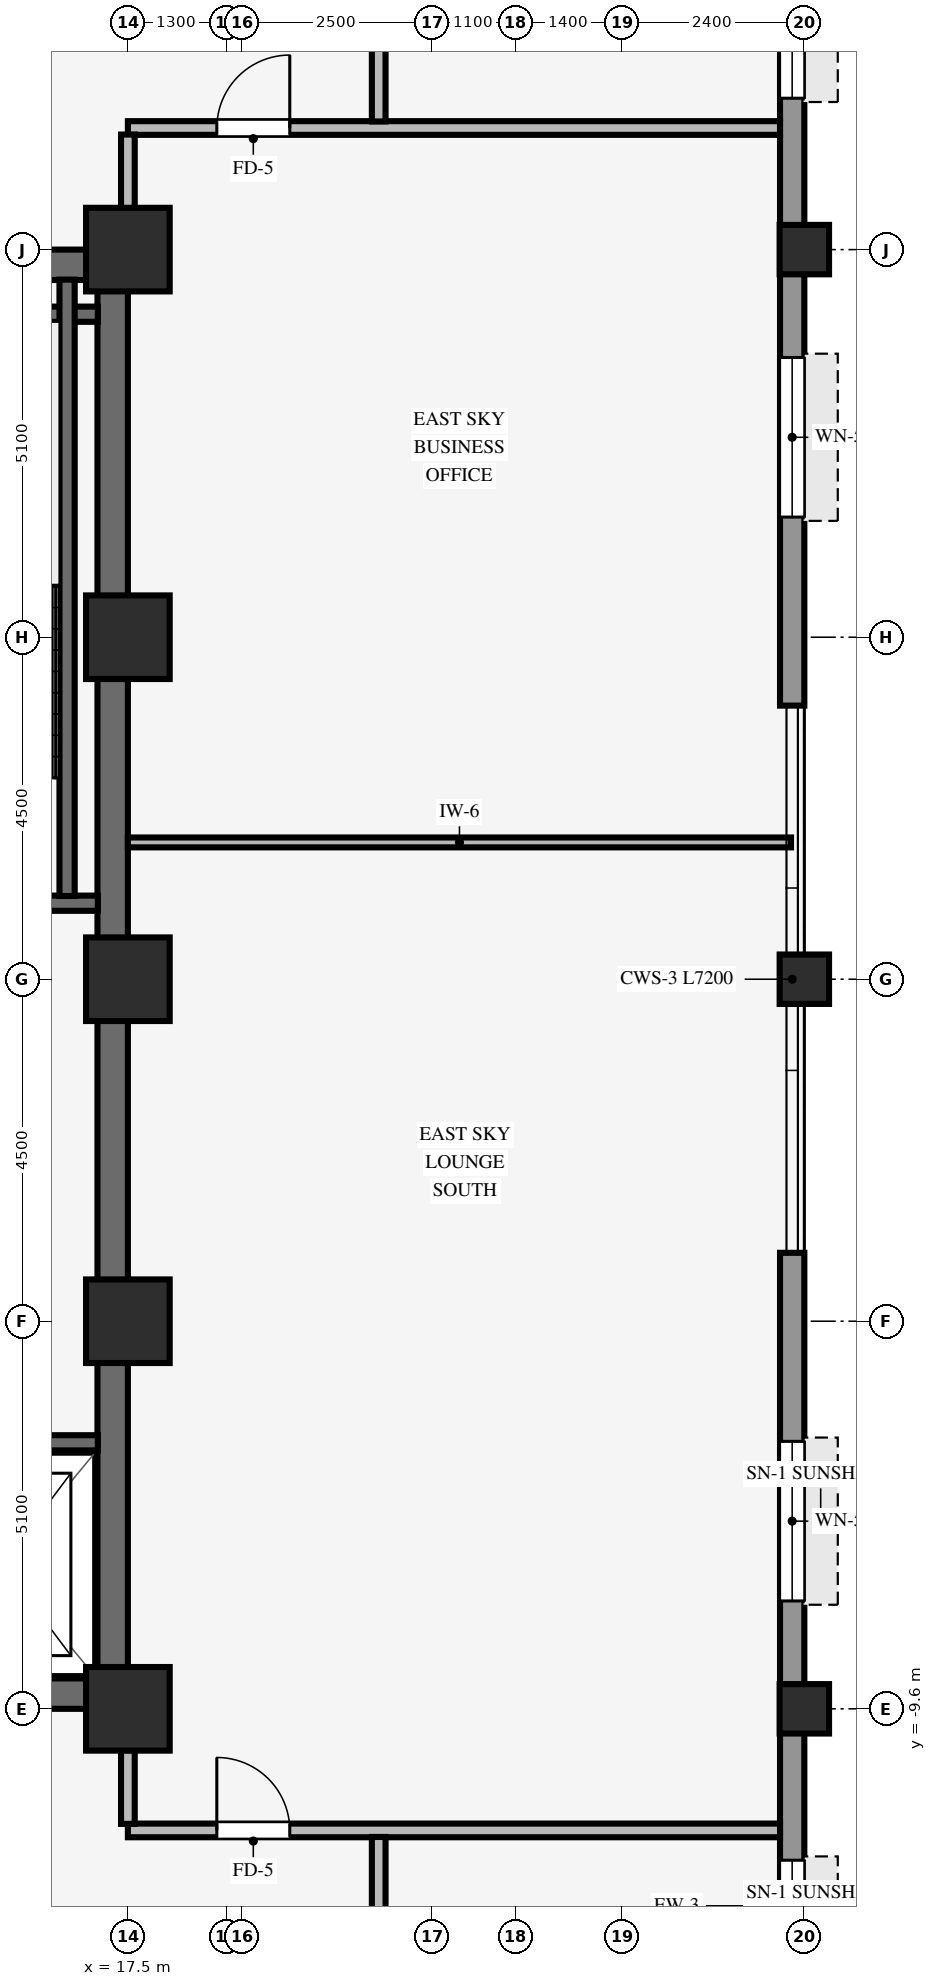
"""IFC4 building model, lengths in metres.
Left out: names, types, materials, properties, quantities, classifications, styles, units other than length and angle.
Written with IfcOpenShell. Run it as: python <this file> out.ifc"""

import sys

from ifc_helpers import new_model, si_unit, direction, frame, frame_2d, origin, origin_2d, place, context, subcontext, project, spatial, rectangle, hollow_rectangle, extrude, source, transform, mapped, element, fill, save


model = new_model("IFC4")
c1 = context("Model", 3, precision=1e-05, world=origin(), true_north=direction((0.0, 1.0)))
c2 = subcontext(c1, "Body", "Model", "MODEL_VIEW")
j1 = project(units=[si_unit("LENGTHUNIT", "METRE"), si_unit("PLANEANGLEUNIT", "RADIAN")], contexts=[c1])
p1 = place(None, origin())
s1 = spatial("IfcSite", under=j1, at=p1, CompositionType="ELEMENT")
p2 = place(p1, origin())
s2 = spatial("IfcBuilding", under=s1, at=p2, CompositionType="ELEMENT")
p3 = place(p2, frame((0.0, 0.0, 120.2)))
s3 = spatial("IfcBuildingStorey", under=s2, at=p3, CompositionType="ELEMENT", Elevation=120.2)
for number, where, z_axis, x_axis in (
    (1, (9.0, -9.4, 0.0), (0.0, 0.0, 1.0), (1.0, 0.0, 0.0)),
    (2, (9.0, 9.4, 0.0), (0.0, 0.0, 1.0), (1.0, 0.0, 0.0)),
):
    element("IfcWall", number, at=place(p3, frame(where, z_axis=z_axis, x_axis=x_axis)), inside=s3, PredefinedType="SHEAR", context=c2, shape_type="SweptSolid", body=[
        extrude(rectangle(XDim=8.5, YDim=0.4, at=frame_2d((4.25, 0.0))), origin(), (0.0, 0.0, 1.0), 3.37),
    ])
p4 = place(p3, frame((17.3, -9.205, 0.0), z_axis=(0.0, 0.0, 1.0), x_axis=(0.0, 1.0, 0.0)))
e3 = element("IfcWall", 3, at=p4, inside=s3, PredefinedType="SHEAR", context=c2, shape_type="SweptSolid", body=[
    extrude(rectangle(XDim=18.41, YDim=0.4, at=frame_2d((9.205, 0.0))), origin(), (0.0, 0.0, 1.0), 3.37),
])
for number, where, z_axis, x_axis in (
    (4, (17.5, -9.6, 0.0), (0.0, 0.0, 1.0), (1.0, 0.0, 0.0)),
    (5, (17.5, -4.5, 0.0), (0.0, 0.0, 1.0), (1.0, 0.0, 0.0)),
    (6, (17.5, 4.5, 0.0), (0.0, 0.0, 1.0), (1.0, 0.0, 0.0)),
    (7, (17.5, 9.6, 0.0), (0.0, 0.0, 1.0), (1.0, 0.0, 0.0)),
    (8, (17.5, 0.0, 0.0), (0.0, 0.0, 1.0), (1.0, 0.0, 0.0)),
):
    element("IfcColumn", number, at=place(p3, frame(where, z_axis=z_axis, x_axis=x_axis)), inside=s3, PredefinedType="COLUMN", context=c2, shape_type="SweptSolid", body=[
        extrude(rectangle(XDim=1.1, YDim=1.1, at=origin_2d()), origin(), (0.0, 0.0, 1.0), 3.37),
    ])
for number, where, z_axis, x_axis in (
    (9, (26.4, -9.6, 0.0), (0.0, 0.0, 1.0), (1.0, 0.0, 0.0)),
    (10, (26.4, 0.0, 0.0), (0.0, 0.0, 1.0), (1.0, 0.0, 0.0)),
    (11, (26.4, 9.6, 0.0), (0.0, 0.0, 1.0), (1.0, 0.0, 0.0)),
):
    element("IfcColumn", number, at=place(p3, frame(where, z_axis=z_axis, x_axis=x_axis)), inside=s3, PredefinedType="COLUMN", context=c2, shape_type="SweptSolid", body=[
        extrude(hollow_rectangle(XDim=0.65, YDim=0.65, WallThickness=0.04, InnerFilletRadius=0.04, OuterFilletRadius=0.08, at=origin_2d()), origin(), (0.0, 0.0, 1.0), 3.37),
    ])
p5 = place(p3, frame((26.24, -20.784, 0.0), z_axis=(0.0, 0.0, 1.0), x_axis=(0.0, 1.0, 0.0)))
e12 = element("IfcWall", 12, at=p5, inside=s3, PredefinedType="STANDARD", context=c2, shape_type="SweptSolid", body=[
    extrude(rectangle(XDim=17.184, YDim=0.32, at=frame_2d((8.592, 0.0))), origin(), (0.0, 0.0, 1.0), 2.705),
])
p6 = place(p5, frame((7.092, 0.0, 0.8)))
e13 = element("IfcOpeningElement", 13, at=p6, cuts=e12, PredefinedType="OPENING", context=c2, shape_type="SweptSolid", body=[
    extrude(rectangle(XDim=2.1, YDim=1.56, at=frame_2d((1.05, 0.78))), frame((0.0, 0.17, 0.0), z_axis=(0.0, -1.0, 0.0), x_axis=(1.0, 0.0, 0.0)), (0.0, 0.0, 1.0), 0.34),
])
p7 = place(p5, frame((12.603, 0.0, 0.8)))
e14 = element("IfcOpeningElement", 14, at=p7, cuts=e12, PredefinedType="OPENING", context=c2, shape_type="SweptSolid", body=[
    extrude(rectangle(XDim=2.1, YDim=1.56, at=frame_2d((1.05, 0.78))), frame((0.0, 0.17, 0.0), z_axis=(0.0, -1.0, 0.0), x_axis=(1.0, 0.0, 0.0)), (0.0, 0.0, 1.0), 0.34),
])
p8 = place(p3, frame((26.24, 3.6, 0.0), z_axis=(0.0, 0.0, 1.0), x_axis=(0.0, 1.0, 0.0)))
e15 = element("IfcWall", 15, at=p8, inside=s3, PredefinedType="STANDARD", context=c2, shape_type="SweptSolid", body=[
    extrude(rectangle(XDim=17.184, YDim=0.32, at=frame_2d((8.592, 0.0))), origin(), (0.0, 0.0, 1.0), 2.705),
])
p9 = place(p8, frame((2.481, 0.0, 0.8)))
e16 = element("IfcOpeningElement", 16, at=p9, cuts=e15, PredefinedType="OPENING", context=c2, shape_type="SweptSolid", body=[
    extrude(rectangle(XDim=2.1, YDim=1.56, at=frame_2d((1.05, 0.78))), frame((0.0, 0.17, 0.0), z_axis=(0.0, -1.0, 0.0), x_axis=(1.0, 0.0, 0.0)), (0.0, 0.0, 1.0), 0.34),
])
p10 = place(p8, frame((7.992, 0.0, 0.8)))
e17 = element("IfcOpeningElement", 17, at=p10, cuts=e15, PredefinedType="OPENING", context=c2, shape_type="SweptSolid", body=[
    extrude(rectangle(XDim=2.1, YDim=1.56, at=frame_2d((1.05, 0.78))), frame((0.0, 0.17, 0.0), z_axis=(0.0, -1.0, 0.0), x_axis=(1.0, 0.0, 0.0)), (0.0, 0.0, 1.0), 0.34),
])
for number, where, z_axis, x_axis in (
    (18, (13.535, 1.0, 0.0), (0.0, 0.0, 1.0), (1.0, 0.0, 0.0)),
    (19, (13.535, 8.75, 0.0), (0.0, 0.0, 1.0), (1.0, 0.0, 0.0)),
):
    element("IfcWall", number, at=place(p3, frame(where, z_axis=z_axis, x_axis=x_axis)), inside=s3, PredefinedType="SHEAR", context=c2, shape_type="SweptSolid", body=[
        extrude(rectangle(XDim=3.57, YDim=0.2, at=frame_2d((1.785, 0.0))), origin(), (0.0, 0.0, 1.0), 3.37),
    ])
p11 = place(p3, frame((16.7, 1.095, 0.0), z_axis=(0.0, 0.0, 1.0), x_axis=(0.0, 1.0, 0.0)))
e20 = element("IfcWall", 20, at=p11, inside=s3, PredefinedType="SHEAR", context=c2, shape_type="SweptSolid", body=[
    extrude(rectangle(XDim=8.11, YDim=0.2, at=frame_2d((4.055, 0.0))), origin(), (0.0, 0.0, 1.0), 3.37),
])
p12 = place(p3, frame((14.645, -6.1, 0.0), z_axis=(0.0, 0.0, 1.0), x_axis=(1.0, 0.0, 0.0)))
e21 = element("IfcWall", 21, at=p12, inside=s3, PredefinedType="SHEAR", context=c2, shape_type="SweptSolid", body=[
    extrude(rectangle(XDim=2.46, YDim=0.2, at=frame_2d((1.23, 0.0))), origin(), (0.0, 0.0, 1.0), 3.37),
])
p13 = place(p3, frame((17.5, -11.2, 0.0), z_axis=(0.0, 0.0, 1.0), x_axis=(1.0, 0.0, 0.0)))
e22 = element("IfcWall", 22, at=p13, inside=s3, PredefinedType="PARTITIONING", context=c2, shape_type="SweptSolid", body=[
    extrude(rectangle(XDim=8.58, YDim=0.18, at=frame_2d((4.29, 0.0))), origin(), (0.0, 0.0, 1.0), 3.36),
])
p14 = place(p13, frame((1.17, 0.0, 0.0)))
e23 = element("IfcOpeningElement", 23, at=p14, cuts=e22, PredefinedType="OPENING", context=c2, shape_type="SweptSolid", body=[
    extrude(rectangle(XDim=0.96, YDim=2.1, at=frame_2d((0.48, 1.05))), frame((0.0, 0.1, 0.0), z_axis=(0.0, -1.0, 0.0), x_axis=(1.0, 0.0, 0.0)), (0.0, 0.0, 1.0), 0.2),
])
p15 = place(p3, frame((17.5, 1.8, 0.0), z_axis=(0.0, 0.0, 1.0), x_axis=(1.0, 0.0, 0.0)))
e24 = element("IfcWall", 24, at=p15, inside=s3, PredefinedType="PARTITIONING", context=c2, shape_type="SweptSolid", body=[
    extrude(rectangle(XDim=8.725, YDim=0.13, at=frame_2d((4.363, 0.0))), origin(), (0.0, 0.0, 1.0), 3.36),
])
p16 = place(p3, frame((17.5, 11.2, 0.0), z_axis=(0.0, 0.0, 1.0), x_axis=(1.0, 0.0, 0.0)))
e25 = element("IfcWall", 25, at=p16, inside=s3, PredefinedType="PARTITIONING", context=c2, shape_type="SweptSolid", body=[
    extrude(rectangle(XDim=8.58, YDim=0.18, at=frame_2d((4.29, 0.0))), origin(), (0.0, 0.0, 1.0), 3.36),
])
p17 = place(p16, frame((1.17, 0.0, 0.0)))
e26 = element("IfcOpeningElement", 26, at=p17, cuts=e25, PredefinedType="OPENING", context=c2, shape_type="SweptSolid", body=[
    extrude(rectangle(XDim=0.96, YDim=2.1, at=frame_2d((0.48, 1.05))), frame((0.0, 0.1, 0.0), z_axis=(0.0, -1.0, 0.0), x_axis=(1.0, 0.0, 0.0)), (0.0, 0.0, 1.0), 0.2),
])
for number, where, z_axis, x_axis in (
    (27, (17.5, -11.114, 0.0), (0.0, 0.0, 1.0), (0.0, 1.0, 0.0)),
    (28, (17.5, 10.146, 0.0), (0.0, 0.0, 1.0), (0.0, 1.0, 0.0)),
):
    element("IfcWall", number, at=place(p3, frame(where, z_axis=z_axis, x_axis=x_axis)), inside=s3, PredefinedType="PARTITIONING", context=c2, shape_type="SweptSolid", body=[
        extrude(rectangle(XDim=0.968, YDim=0.18, at=frame_2d((0.484, 0.0))), origin(), (0.0, 0.0, 1.0), 2.816),
    ])
for number, where, z_axis, x_axis in (
    (29, (20.8, -13.514, 0.0), (0.0, 0.0, 1.0), (0.0, 1.0, 0.0)),
    (30, (20.8, 11.286, 0.0), (0.0, 0.0, 1.0), (0.0, 1.0, 0.0)),
):
    element("IfcWall", number, at=place(p3, frame(where, z_axis=z_axis, x_axis=x_axis)), inside=s3, PredefinedType="PARTITIONING", context=c2, shape_type="SweptSolid", body=[
        extrude(rectangle(XDim=2.228, YDim=0.18, at=frame_2d((1.114, 0.0))), origin(), (0.0, 0.0, 1.0), 3.36),
    ])
m1 = source(origin(), c2, "Body", "SweptSolid", [
    extrude(rectangle(XDim=2.1, YDim=1.56, at=frame_2d((1.05, 0.78))), frame((0.0, 0.03, 0.0), z_axis=(0.0, -1.0, 0.0), x_axis=(1.0, 0.0, 0.0)), (0.0, 0.0, 1.0), 0.06),
])
p18 = place(p6, origin())
e31 = element("IfcWindow", 31, at=p18, inside=s3, PartitioningType="SINGLE_PANEL", PredefinedType="WINDOW", context=c2, shape_type="MappedRepresentation", body=[
    mapped(m1, transform((0.0, 0.0, 0.0), scale=1.0)),
])
fill(e13, e31)
p19 = place(p7, origin())
e32 = element("IfcWindow", 32, at=p19, inside=s3, PartitioningType="SINGLE_PANEL", PredefinedType="WINDOW", context=c2, shape_type="MappedRepresentation", body=[
    mapped(m1, transform((0.0, 0.0, 0.0), scale=1.0)),
])
fill(e14, e32)
p20 = place(p9, origin())
e33 = element("IfcWindow", 33, at=p20, inside=s3, PartitioningType="SINGLE_PANEL", PredefinedType="WINDOW", context=c2, shape_type="MappedRepresentation", body=[
    mapped(m1, transform((0.0, 0.0, 0.0), scale=1.0)),
])
fill(e16, e33)
p21 = place(p10, origin())
e34 = element("IfcWindow", 34, at=p21, inside=s3, PartitioningType="SINGLE_PANEL", PredefinedType="WINDOW", context=c2, shape_type="MappedRepresentation", body=[
    mapped(m1, transform((0.0, 0.0, 0.0), scale=1.0)),
])
fill(e17, e34)
m2 = source(origin(), c2, "Body", "SweptSolid", [
    extrude(rectangle(XDim=0.96, YDim=2.1, at=frame_2d((0.48, 1.05))), frame((0.0, 0.025, 0.0), z_axis=(0.0, -1.0, 0.0), x_axis=(1.0, 0.0, 0.0)), (0.0, 0.0, 1.0), 0.05),
])
p22 = place(p14, origin())
e35 = element("IfcDoor", 35, at=p22, inside=s3, OperationType="SINGLE_SWING_LEFT", PredefinedType="DOOR", context=c2, shape_type="MappedRepresentation", body=[
    mapped(m2, transform((0.0, 0.0, 0.0), scale=1.0)),
])
fill(e23, e35)
p23 = place(p17, origin())
e36 = element("IfcDoor", 36, at=p23, inside=s3, OperationType="SINGLE_SWING_RIGHT", PredefinedType="DOOR", context=c2, shape_type="MappedRepresentation", body=[
    mapped(m2, transform((0.0, 0.0, 0.0), scale=1.0)),
])
fill(e26, e36)
save(model, sys.argv[1])
